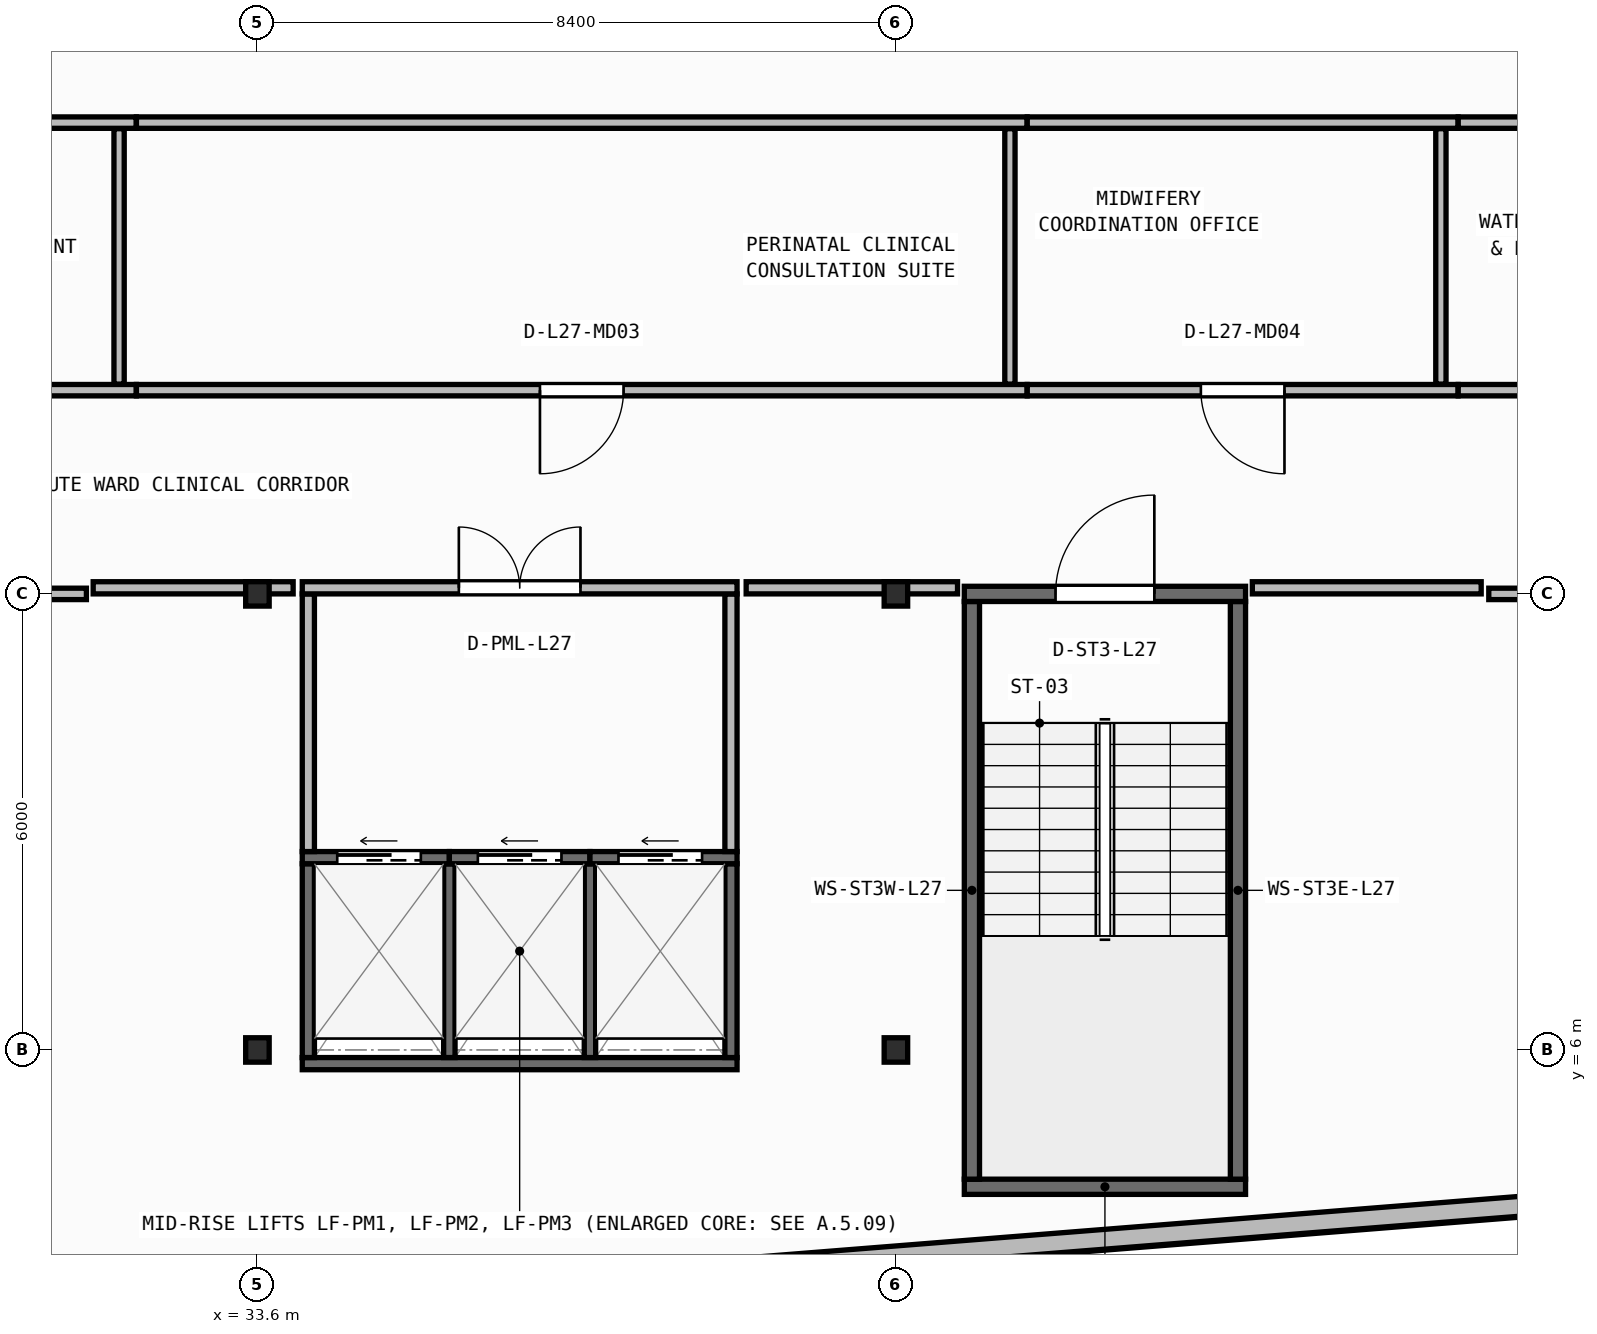
"""IFC4 building model, lengths in metres.
Left out: names, types, materials, properties, quantities, classifications, styles, units other than length and angle.
Written with IfcOpenShell. Run it as: python <this file> out.ifc"""

import sys

from ifc_helpers import new_model, si_unit, direction, frame, frame_2d, origin, origin_2d, place, context, subcontext, project, spatial, rectangle, i_section, extrude, element, fill, save


model = new_model("IFC4")
c1 = context("Model", 3, precision=1e-05, world=origin(), true_north=direction((0.0, 1.0)))
c2 = subcontext(c1, "Body", "Model", "MODEL_VIEW")
j1 = project(units=[si_unit("LENGTHUNIT", "METRE"), si_unit("PLANEANGLEUNIT", "RADIAN")], contexts=[c1])
p1 = place(None, origin())
s1 = spatial("IfcSite", under=j1, at=p1, CompositionType="ELEMENT")
p2 = place(p1, origin())
s2 = spatial("IfcBuilding", under=s1, at=p2, CompositionType="ELEMENT")
p3 = place(p2, frame((0.0, 0.0, 111.25)))
s3 = spatial("IfcBuildingStorey", under=s2, at=p3, CompositionType="ELEMENT", Elevation=111.25)
for number, where, z_axis, x_axis in (
    (1, (33.6, 6.0, 0.0), (0.0, 0.0, 1.0), (1.0, 0.0, 0.0)),
    (2, (42.0, 6.0, 0.0), (0.0, 0.0, 1.0), (1.0, 0.0, 0.0)),
    (3, (33.6, 12.0, 0.0), (0.0, 0.0, 1.0), (1.0, 0.0, 0.0)),
    (4, (42.0, 12.0, 0.0), (0.0, 0.0, 1.0), (1.0, 0.0, 0.0)),
):
    element("IfcColumn", number, at=place(p3, frame(where, z_axis=z_axis, x_axis=x_axis)), inside=s3, PredefinedType="COLUMN", context=c2, shape_type="SweptSolid", body=[
        extrude(i_section(OverallWidth=0.309, OverallDepth=0.321, WebThickness=0.014, FlangeThickness=0.022, FilletRadius=0.017, at=origin_2d()), origin(), (0.0, 0.0, 1.0), 3.95),
    ])
p4 = place(p3, frame((2.76, 0.173, 0.0), z_axis=(0.0, 0.0, 1.0), x_axis=(0.996857931723, 0.079210251617, 0.0)))
e5 = element("IfcWall", 5, at=p4, inside=s3, PredefinedType="STANDARD", context=c2, shape_type="SweptSolid", body=[
    extrude(rectangle(XDim=51.442, YDim=0.26, at=frame_2d((25.721, 0.0))), origin(), (0.0, 0.0, 1.0), 3.71),
])
p5 = place(p4, frame((24.521, 0.0, 0.9)))
e6 = element("IfcOpeningElement", 6, at=p5, cuts=e5, PredefinedType="OPENING", context=c2, shape_type="SweptSolid", body=[
    extrude(rectangle(XDim=2.4, YDim=1.65, at=frame_2d((1.2, 0.825))), frame((0.0, 0.14, 0.0), z_axis=(0.0, -1.0, 0.0), x_axis=(1.0, 0.0, 0.0)), (0.0, 0.0, 1.0), 0.28),
])
p6 = place(p3, frame((42.9, 4.2, 0.0), z_axis=(0.0, 0.0, 1.0), x_axis=(1.0, 0.0, 0.0)))
e7 = element("IfcWall", 7, at=p6, inside=s3, PredefinedType="SHEAR", context=c2, shape_type="SweptSolid", body=[
    extrude(rectangle(XDim=3.7, YDim=0.2, at=frame_2d((1.85, 0.0))), origin(), (0.0, 0.0, 1.0), 3.71),
])
for number, where, z_axis, x_axis in (
    (8, (43.0, 4.3, 0.0), (0.0, 0.0, 1.0), (0.0, 1.0, 0.0)),
    (9, (46.5, 4.3, 0.0), (0.0, 0.0, 1.0), (0.0, 1.0, 0.0)),
):
    element("IfcWall", number, at=place(p3, frame(where, z_axis=z_axis, x_axis=x_axis)), inside=s3, PredefinedType="SHEAR", context=c2, shape_type="SweptSolid", body=[
        extrude(rectangle(XDim=7.6, YDim=0.2, at=frame_2d((3.8, 0.0))), origin(), (0.0, 0.0, 1.0), 3.71),
    ])
p7 = place(p3, frame((42.9, 12.0, 0.0), z_axis=(0.0, 0.0, 1.0), x_axis=(1.0, 0.0, 0.0)))
e10 = element("IfcWall", 10, at=p7, inside=s3, PredefinedType="SHEAR", context=c2, shape_type="SweptSolid", body=[
    extrude(rectangle(XDim=3.7, YDim=0.2, at=frame_2d((1.85, 0.0))), origin(), (0.0, 0.0, 1.0), 3.71),
])
p8 = place(p7, frame((1.2, 0.0, 0.0)))
e11 = element("IfcOpeningElement", 11, at=p8, cuts=e10, PredefinedType="OPENING", context=c2, shape_type="SweptSolid", body=[
    extrude(rectangle(XDim=1.3, YDim=2.15, at=frame_2d((0.65, 1.075))), frame((0.0, 0.11, 0.0), z_axis=(0.0, -1.0, 0.0), x_axis=(1.0, 0.0, 0.0)), (0.0, 0.0, 1.0), 0.22),
])
p9 = place(p3, frame((34.19, 5.82, 0.0), z_axis=(0.0, 0.0, 1.0), x_axis=(1.0, 0.0, 0.0)))
e12 = element("IfcWall", 12, at=p9, inside=s3, PredefinedType="SHEAR", context=c2, shape_type="SweptSolid", body=[
    extrude(rectangle(XDim=5.72, YDim=0.16, at=frame_2d((2.86, 0.0))), origin(), (0.0, 0.0, 1.0), 3.71),
])
for number, where, z_axis, x_axis in (
    (13, (34.27, 5.9, 0.0), (0.0, 0.0, 1.0), (0.0, 1.0, 0.0)),
    (14, (39.83, 5.9, 0.0), (0.0, 0.0, 1.0), (0.0, 1.0, 0.0)),
):
    element("IfcWall", number, at=place(p3, frame(where, z_axis=z_axis, x_axis=x_axis)), inside=s3, PredefinedType="SHEAR", context=c2, shape_type="SweptSolid", body=[
        extrude(rectangle(XDim=2.55, YDim=0.16, at=frame_2d((1.275, 0.0))), origin(), (0.0, 0.0, 1.0), 3.71),
    ])
for number, where, z_axis, x_axis in (
    (15, (36.125, 5.9, 0.0), (0.0, 0.0, 1.0), (0.0, 1.0, 0.0)),
    (16, (37.975, 5.9, 0.0), (0.0, 0.0, 1.0), (0.0, 1.0, 0.0)),
):
    element("IfcWall", number, at=place(p3, frame(where, z_axis=z_axis, x_axis=x_axis)), inside=s3, PredefinedType="SHEAR", context=c2, shape_type="SweptSolid", body=[
        extrude(rectangle(XDim=2.55, YDim=0.15, at=frame_2d((1.275, 0.0))), origin(), (0.0, 0.0, 1.0), 3.71),
    ])
p10 = place(p3, frame((34.19, 8.53, 0.0), z_axis=(0.0, 0.0, 1.0), x_axis=(1.0, 0.0, 0.0)))
e17 = element("IfcWall", 17, at=p10, inside=s3, PredefinedType="SHEAR", context=c2, shape_type="SweptSolid", body=[
    extrude(rectangle(XDim=1.935, YDim=0.16, at=frame_2d((0.968, 0.0))), origin(), (0.0, 0.0, 1.0), 3.71),
])
p11 = place(p10, frame((0.46, 0.0, 0.0)))
e18 = element("IfcOpeningElement", 18, at=p11, cuts=e17, PredefinedType="OPENING", context=c2, shape_type="SweptSolid", body=[
    extrude(rectangle(XDim=1.1, YDim=2.15, at=frame_2d((0.55, 1.075))), frame((0.0, 0.09, 0.0), z_axis=(0.0, -1.0, 0.0), x_axis=(1.0, 0.0, 0.0)), (0.0, 0.0, 1.0), 0.18),
])
p12 = place(p3, frame((36.125, 8.53, 0.0), z_axis=(0.0, 0.0, 1.0), x_axis=(1.0, 0.0, 0.0)))
e19 = element("IfcWall", 19, at=p12, inside=s3, PredefinedType="SHEAR", context=c2, shape_type="SweptSolid", body=[
    extrude(rectangle(XDim=1.85, YDim=0.16, at=frame_2d((0.925, 0.0))), origin(), (0.0, 0.0, 1.0), 3.71),
])
p13 = place(p12, frame((0.375, 0.0, 0.0)))
e20 = element("IfcOpeningElement", 20, at=p13, cuts=e19, PredefinedType="OPENING", context=c2, shape_type="SweptSolid", body=[
    extrude(rectangle(XDim=1.1, YDim=2.15, at=frame_2d((0.55, 1.075))), frame((0.0, 0.09, 0.0), z_axis=(0.0, -1.0, 0.0), x_axis=(1.0, 0.0, 0.0)), (0.0, 0.0, 1.0), 0.18),
])
p14 = place(p3, frame((37.975, 8.53, 0.0), z_axis=(0.0, 0.0, 1.0), x_axis=(1.0, 0.0, 0.0)))
e21 = element("IfcWall", 21, at=p14, inside=s3, PredefinedType="SHEAR", context=c2, shape_type="SweptSolid", body=[
    extrude(rectangle(XDim=1.935, YDim=0.16, at=frame_2d((0.967, 0.0))), origin(), (0.0, 0.0, 1.0), 3.71),
])
p15 = place(p14, frame((0.375, 0.0, 0.0)))
e22 = element("IfcOpeningElement", 22, at=p15, cuts=e21, PredefinedType="OPENING", context=c2, shape_type="SweptSolid", body=[
    extrude(rectangle(XDim=1.1, YDim=2.15, at=frame_2d((0.55, 1.075))), frame((0.0, 0.09, 0.0), z_axis=(0.0, -1.0, 0.0), x_axis=(1.0, 0.0, 0.0)), (0.0, 0.0, 1.0), 0.18),
])
for number, where, z_axis, x_axis in (
    (23, (34.27, 8.61, 0.0), (0.0, 0.0, 1.0), (0.0, 1.0, 0.0)),
    (24, (39.83, 8.61, 0.0), (0.0, 0.0, 1.0), (0.0, 1.0, 0.0)),
):
    element("IfcWall", number, at=place(p3, frame(where, z_axis=z_axis, x_axis=x_axis)), inside=s3, PredefinedType="PARTITIONING", context=c2, shape_type="SweptSolid", body=[
        extrude(rectangle(XDim=3.39, YDim=0.16, at=frame_2d((1.695, 0.0))), origin(), (0.0, 0.0, 1.0), 3.71),
    ])
p16 = place(p3, frame((34.19, 12.08, 0.0), z_axis=(0.0, 0.0, 1.0), x_axis=(1.0, 0.0, 0.0)))
e25 = element("IfcWall", 25, at=p16, inside=s3, PredefinedType="PARTITIONING", context=c2, shape_type="SweptSolid", body=[
    extrude(rectangle(XDim=5.72, YDim=0.16, at=frame_2d((2.86, 0.0))), origin(), (0.0, 0.0, 1.0), 3.083),
])
p17 = place(p16, frame((2.06, 0.0, 0.0)))
e26 = element("IfcOpeningElement", 26, at=p17, cuts=e25, PredefinedType="OPENING", context=c2, shape_type="SweptSolid", body=[
    extrude(rectangle(XDim=1.6, YDim=2.05, at=frame_2d((0.8, 1.025))), frame((0.0, 0.09, 0.0), z_axis=(0.0, -1.0, 0.0), x_axis=(1.0, 0.0, 0.0)), (0.0, 0.0, 1.0), 0.18),
])
p18 = place(p3, frame((31.35, 12.0, 0.0), z_axis=(0.0, 0.0, 1.0), x_axis=(-1.0, 0.0, 0.0)))
e27 = element("IfcWall", 27, at=p18, inside=s3, PredefinedType="PARTITIONING", context=c2, shape_type="SweptSolid", body=[
    extrude(rectangle(XDim=5.996, YDim=0.15, at=frame_2d((2.998, 0.0))), origin(), (0.0, 0.0, 1.0), 3.083),
])
p19 = place(p18, frame((1.436, 0.0, 0.0)))
e28 = element("IfcOpeningElement", 28, at=p19, cuts=e27, PredefinedType="OPENING", context=c2, shape_type="SweptSolid", body=[
    extrude(rectangle(XDim=1.1, YDim=2.1, at=frame_2d((0.55, 1.05))), frame((0.0, 0.085, 0.0), z_axis=(0.0, -1.0, 0.0), x_axis=(1.0, 0.0, 0.0)), (0.0, 0.0, 1.0), 0.17),
])
p20 = place(p3, frame((56.52, 12.0, 0.0), z_axis=(0.0, 0.0, 1.0), x_axis=(-1.0, 0.0, 0.0)))
e29 = element("IfcWall", 29, at=p20, inside=s3, PredefinedType="PARTITIONING", context=c2, shape_type="SweptSolid", body=[
    extrude(rectangle(XDim=6.72, YDim=0.15, at=frame_2d((3.36, 0.0))), origin(), (0.0, 0.0, 1.0), 3.083),
])
p21 = place(p20, frame((0.331, 0.0, 0.0)))
e30 = element("IfcOpeningElement", 30, at=p21, cuts=e29, PredefinedType="OPENING", context=c2, shape_type="SweptSolid", body=[
    extrude(rectangle(XDim=1.1, YDim=2.1, at=frame_2d((0.55, 1.05))), frame((0.0, 0.085, 0.0), z_axis=(0.0, -1.0, 0.0), x_axis=(1.0, 0.0, 0.0)), (0.0, 0.0, 1.0), 0.17),
])
p22 = place(p3, frame((32.006, 14.68, 0.0), z_axis=(0.0, 0.0, 1.0), x_axis=(-1.0, 0.0, 0.0)))
e31 = element("IfcWall", 31, at=p22, inside=s3, PredefinedType="PARTITIONING", context=c2, shape_type="SweptSolid", body=[
    extrude(rectangle(XDim=10.452, YDim=0.15, at=frame_2d((5.226, 0.0))), origin(), (0.0, 0.0, 1.0), 3.71),
])
p23 = place(p22, frame((4.676, 0.0, 0.0)))
e32 = element("IfcOpeningElement", 32, at=p23, cuts=e31, PredefinedType="OPENING", context=c2, shape_type="SweptSolid", body=[
    extrude(rectangle(XDim=1.1, YDim=2.1, at=frame_2d((0.55, 1.05))), frame((0.0, 0.085, 0.0), z_axis=(0.0, -1.0, 0.0), x_axis=(1.0, 0.0, 0.0)), (0.0, 0.0, 1.0), 0.17),
])
p24 = place(p3, frame((43.726, 14.68, 0.0), z_axis=(0.0, 0.0, 1.0), x_axis=(-1.0, 0.0, 0.0)))
e33 = element("IfcWall", 33, at=p24, inside=s3, PredefinedType="PARTITIONING", context=c2, shape_type="SweptSolid", body=[
    extrude(rectangle(XDim=11.718, YDim=0.15, at=frame_2d((5.859, 0.0))), origin(), (0.0, 0.0, 1.0), 3.71),
])
p25 = place(p24, frame((5.309, 0.0, 0.0)))
e34 = element("IfcOpeningElement", 34, at=p25, cuts=e33, PredefinedType="OPENING", context=c2, shape_type="SweptSolid", body=[
    extrude(rectangle(XDim=1.1, YDim=2.1, at=frame_2d((0.55, 1.05))), frame((0.0, 0.085, 0.0), z_axis=(0.0, -1.0, 0.0), x_axis=(1.0, 0.0, 0.0)), (0.0, 0.0, 1.0), 0.17),
])
p26 = place(p3, frame((49.396, 14.68, 0.0), z_axis=(0.0, 0.0, 1.0), x_axis=(-1.0, 0.0, 0.0)))
e35 = element("IfcWall", 35, at=p26, inside=s3, PredefinedType="PARTITIONING", context=c2, shape_type="SweptSolid", body=[
    extrude(rectangle(XDim=5.668, YDim=0.15, at=frame_2d((2.834, 0.0))), origin(), (0.0, 0.0, 1.0), 3.71),
])
p27 = place(p26, frame((2.284, 0.0, 0.0)))
e36 = element("IfcOpeningElement", 36, at=p27, cuts=e35, PredefinedType="OPENING", context=c2, shape_type="SweptSolid", body=[
    extrude(rectangle(XDim=1.1, YDim=2.1, at=frame_2d((0.55, 1.05))), frame((0.0, 0.085, 0.0), z_axis=(0.0, -1.0, 0.0), x_axis=(1.0, 0.0, 0.0)), (0.0, 0.0, 1.0), 0.17),
])
p28 = place(p3, frame((56.52, 14.68, 0.0), z_axis=(0.0, 0.0, 1.0), x_axis=(-1.0, 0.0, 0.0)))
e37 = element("IfcWall", 37, at=p28, inside=s3, PredefinedType="PARTITIONING", context=c2, shape_type="SweptSolid", body=[
    extrude(rectangle(XDim=7.122, YDim=0.15, at=frame_2d((3.561, 0.0))), origin(), (0.0, 0.0, 1.0), 3.71),
])
p29 = place(p28, frame((3.011, 0.0, 0.0)))
e38 = element("IfcOpeningElement", 38, at=p29, cuts=e37, PredefinedType="OPENING", context=c2, shape_type="SweptSolid", body=[
    extrude(rectangle(XDim=1.1, YDim=2.1, at=frame_2d((0.55, 1.05))), frame((0.0, 0.085, 0.0), z_axis=(0.0, -1.0, 0.0), x_axis=(1.0, 0.0, 0.0)), (0.0, 0.0, 1.0), 0.17),
])
p30 = place(p3, frame((21.72, 18.2, 0.0), z_axis=(0.0, 0.0, 1.0), x_axis=(1.0, 0.0, 0.0)))
e39 = element("IfcWall", 39, at=p30, inside=s3, PredefinedType="PARTITIONING", context=c2, shape_type="SweptSolid", body=[
    extrude(rectangle(XDim=10.286, YDim=0.15, at=frame_2d((5.143, 0.0))), origin(), (0.0, 0.0, 1.0), 3.71),
])
p31 = place(p3, frame((32.008, 18.2, 0.0), z_axis=(0.0, 0.0, 1.0), x_axis=(1.0, 0.0, 0.0)))
e40 = element("IfcWall", 40, at=p31, inside=s3, PredefinedType="PARTITIONING", context=c2, shape_type="SweptSolid", body=[
    extrude(rectangle(XDim=11.718, YDim=0.15, at=frame_2d((5.859, 0.0))), origin(), (0.0, 0.0, 1.0), 3.71),
])
p32 = place(p3, frame((43.728, 18.2, 0.0), z_axis=(0.0, 0.0, 1.0), x_axis=(1.0, 0.0, 0.0)))
e41 = element("IfcWall", 41, at=p32, inside=s3, PredefinedType="PARTITIONING", context=c2, shape_type="SweptSolid", body=[
    extrude(rectangle(XDim=5.668, YDim=0.15, at=frame_2d((2.834, 0.0))), origin(), (0.0, 0.0, 1.0), 3.71),
])
p33 = place(p3, frame((49.398, 18.2, 0.0), z_axis=(0.0, 0.0, 1.0), x_axis=(1.0, 0.0, 0.0)))
e42 = element("IfcWall", 42, at=p33, inside=s3, PredefinedType="PARTITIONING", context=c2, shape_type="SweptSolid", body=[
    extrude(rectangle(XDim=7.122, YDim=0.15, at=frame_2d((3.561, 0.0))), origin(), (0.0, 0.0, 1.0), 3.71),
])
for number, where, z_axis, x_axis in (
    (43, (31.78, 14.76, 0.0), (0.0, 0.0, 1.0), (0.0, 1.0, 0.0)),
    (44, (43.5, 14.76, 0.0), (0.0, 0.0, 1.0), (0.0, 1.0, 0.0)),
    (45, (49.17, 14.76, 0.0), (0.0, 0.0, 1.0), (0.0, 1.0, 0.0)),
):
    element("IfcWall", number, at=place(p3, frame(where, z_axis=z_axis, x_axis=x_axis)), inside=s3, PredefinedType="PARTITIONING", context=c2, shape_type="SweptSolid", body=[
        extrude(rectangle(XDim=3.36, YDim=0.135, at=frame_2d((1.68, 0.0))), origin(), (0.0, 0.0, 1.0), 3.71),
    ])
p34 = place(p3, frame((31.439, 12.08, 0.0), z_axis=(0.0, 0.0, 1.0), x_axis=(1.0, 0.0, 0.0)))
e46 = element("IfcWall", 46, at=p34, inside=s3, PredefinedType="PARTITIONING", context=c2, shape_type="SweptSolid", body=[
    extrude(rectangle(XDim=2.631, YDim=0.16, at=frame_2d((1.315, 0.0))), origin(), (0.0, 0.0, 1.0), 3.083),
])
p35 = place(p3, frame((40.03, 12.08, 0.0), z_axis=(0.0, 0.0, 1.0), x_axis=(1.0, 0.0, 0.0)))
e47 = element("IfcWall", 47, at=p35, inside=s3, PredefinedType="PARTITIONING", context=c2, shape_type="SweptSolid", body=[
    extrude(rectangle(XDim=2.781, YDim=0.16, at=frame_2d((1.39, 0.0))), origin(), (0.0, 0.0, 1.0), 3.083),
])
p36 = place(p3, frame((46.689, 12.08, 0.0), z_axis=(0.0, 0.0, 1.0), x_axis=(1.0, 0.0, 0.0)))
e48 = element("IfcWall", 48, at=p36, inside=s3, PredefinedType="PARTITIONING", context=c2, shape_type="SweptSolid", body=[
    extrude(rectangle(XDim=3.011, YDim=0.16, at=frame_2d((1.505, 0.0))), origin(), (0.0, 0.0, 1.0), 3.083),
])
p37 = place(p8, origin())
e49 = element("IfcDoor", 49, at=p37, inside=s3, OperationType="SINGLE_SWING_RIGHT", PredefinedType="DOOR", context=c2, shape_type="SweptSolid", body=[
    extrude(rectangle(XDim=1.3, YDim=2.15, at=frame_2d((0.65, 1.075))), frame((0.0, 0.025, 0.0), z_axis=(0.0, -1.0, 0.0), x_axis=(1.0, 0.0, 0.0)), (0.0, 0.0, 1.0), 0.05),
])
fill(e11, e49)
p38 = place(p11, origin())
e50 = element("IfcDoor", 50, at=p38, inside=s3, OperationType="SLIDING_TO_LEFT", PredefinedType="DOOR", context=c2, shape_type="SweptSolid", body=[
    extrude(rectangle(XDim=1.1, YDim=2.15, at=frame_2d((0.55, 1.075))), frame((0.0, 0.025, 0.0), z_axis=(0.0, -1.0, 0.0), x_axis=(1.0, 0.0, 0.0)), (0.0, 0.0, 1.0), 0.05),
])
fill(e18, e50)
p39 = place(p13, origin())
e51 = element("IfcDoor", 51, at=p39, inside=s3, OperationType="SLIDING_TO_LEFT", PredefinedType="DOOR", context=c2, shape_type="SweptSolid", body=[
    extrude(rectangle(XDim=1.1, YDim=2.15, at=frame_2d((0.55, 1.075))), frame((0.0, 0.025, 0.0), z_axis=(0.0, -1.0, 0.0), x_axis=(1.0, 0.0, 0.0)), (0.0, 0.0, 1.0), 0.05),
])
fill(e20, e51)
p40 = place(p15, origin())
e52 = element("IfcDoor", 52, at=p40, inside=s3, OperationType="SLIDING_TO_LEFT", PredefinedType="DOOR", context=c2, shape_type="SweptSolid", body=[
    extrude(rectangle(XDim=1.1, YDim=2.15, at=frame_2d((0.55, 1.075))), frame((0.0, 0.025, 0.0), z_axis=(0.0, -1.0, 0.0), x_axis=(1.0, 0.0, 0.0)), (0.0, 0.0, 1.0), 0.05),
])
fill(e22, e52)
p41 = place(p17, origin())
e53 = element("IfcDoor", 53, at=p41, inside=s3, OperationType="DOUBLE_DOOR_SINGLE_SWING", PredefinedType="DOOR", context=c2, shape_type="SweptSolid", body=[
    extrude(rectangle(XDim=1.6, YDim=2.05, at=frame_2d((0.8, 1.025))), frame((0.0, 0.025, 0.0), z_axis=(0.0, -1.0, 0.0), x_axis=(1.0, 0.0, 0.0)), (0.0, 0.0, 1.0), 0.05),
])
fill(e26, e53)
p42 = place(p25, origin())
e54 = element("IfcDoor", 54, at=p42, inside=s3, OperationType="SINGLE_SWING_RIGHT", PredefinedType="DOOR", context=c2, shape_type="SweptSolid", body=[
    extrude(rectangle(XDim=1.1, YDim=2.1, at=frame_2d((0.55, 1.05))), frame((0.0, 0.025, 0.0), z_axis=(0.0, -1.0, 0.0), x_axis=(1.0, 0.0, 0.0)), (0.0, 0.0, 1.0), 0.05),
])
fill(e34, e54)
p43 = place(p27, origin())
e55 = element("IfcDoor", 55, at=p43, inside=s3, OperationType="SINGLE_SWING_LEFT", PredefinedType="DOOR", context=c2, shape_type="SweptSolid", body=[
    extrude(rectangle(XDim=1.1, YDim=2.1, at=frame_2d((0.55, 1.05))), frame((0.0, 0.025, 0.0), z_axis=(0.0, -1.0, 0.0), x_axis=(1.0, 0.0, 0.0)), (0.0, 0.0, 1.0), 0.05),
])
fill(e36, e55)
save(model, sys.argv[1])
